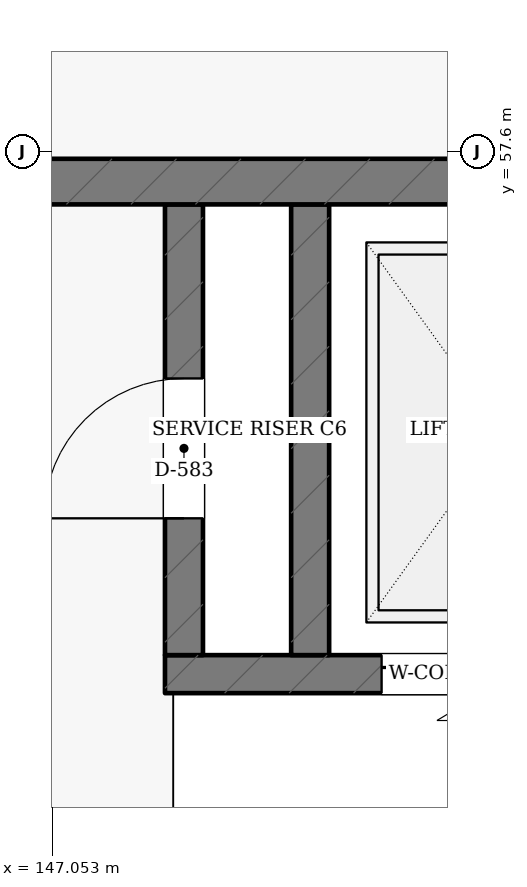
"""IFC4 building model, lengths in metres.
Left out: names, types, materials, properties, quantities, classifications, styles, units other than length and angle.
Written with IfcOpenShell. Run it as: python <this file> out.ifc"""

import sys

from ifc_helpers import new_model, si_unit, direction, frame, frame_2d, origin, place, context, subcontext, project, spatial, rectangle, extrude, element, fill, save


model = new_model("IFC4")
c1 = context("Model", 3, precision=1e-05, world=origin(), true_north=direction((0.0, 1.0)))
c2 = subcontext(c1, "Body", "Model", "MODEL_VIEW")
j1 = project(units=[si_unit("LENGTHUNIT", "METRE"), si_unit("PLANEANGLEUNIT", "RADIAN")], contexts=[c1])
p1 = place(None, origin())
s1 = spatial("IfcSite", under=j1, at=p1, CompositionType="ELEMENT")
p2 = place(p1, origin())
s2 = spatial("IfcBuilding", under=s1, at=p2, CompositionType="ELEMENT")
p3 = place(p2, frame((0.0, 0.0, 5.4)))
s3 = spatial("IfcBuildingStorey", under=s2, at=p3, CompositionType="ELEMENT", Elevation=5.4)
p4 = place(p3, frame((147.795, 54.16, 0.0), z_axis=(0.0, 0.0, 1.0), x_axis=(1.0, 0.0, 0.0)))
e1 = element("IfcWall", 1, at=p4, inside=s3, PredefinedType="SHEAR", context=c2, shape_type="SweptSolid", body=[
    extrude(rectangle(XDim=3.58, YDim=0.25, at=frame_2d((1.79, 0.0))), origin(), (0.0, 0.0, 1.0), 3.55),
])
p5 = place(p4, frame((1.425, 0.0, 0.0)))
e2 = element("IfcOpeningElement", 2, at=p5, cuts=e1, PredefinedType="OPENING", context=c2, shape_type="SweptSolid", body=[
    extrude(rectangle(XDim=1.3, YDim=2.2, at=frame_2d((0.65, 1.1))), frame((0.0, 0.135, 0.0), z_axis=(0.0, -1.0, 0.0), x_axis=(1.0, 0.0, 0.0)), (0.0, 0.0, 1.0), 0.27),
])
p6 = place(p3, frame((148.75, 54.285, 0.0), z_axis=(0.0, 0.0, 1.0), x_axis=(0.0, 1.0, 0.0)))
e3 = element("IfcWall", 3, at=p6, inside=s3, PredefinedType="SHEAR", context=c2, shape_type="SweptSolid", body=[
    extrude(rectangle(XDim=2.965, YDim=0.25, at=frame_2d((1.482, 0.0))), origin(), (0.0, 0.0, 1.0), 3.55),
])
p7 = place(p3, frame((147.92, 54.285, 0.0), z_axis=(0.0, 0.0, 1.0), x_axis=(0.0, 1.0, 0.0)))
e4 = element("IfcWall", 4, at=p7, inside=s3, PredefinedType="SHEAR", context=c2, shape_type="SweptSolid", body=[
    extrude(rectangle(XDim=2.965, YDim=0.25, at=frame_2d((1.482, 0.0))), origin(), (0.0, 0.0, 1.0), 3.55),
])
p8 = place(p7, frame((0.9, 0.0, 0.0)))
e5 = element("IfcOpeningElement", 5, at=p8, cuts=e4, PredefinedType="OPENING", context=c2, shape_type="SweptSolid", body=[
    extrude(rectangle(XDim=0.92, YDim=2.05, at=frame_2d((0.46, 1.025))), frame((0.0, 0.135, 0.0), z_axis=(0.0, -1.0, 0.0), x_axis=(1.0, 0.0, 0.0)), (0.0, 0.0, 1.0), 0.27),
])
p9 = place(p3, frame((144.0, 57.4, 0.0), z_axis=(0.0, 0.0, 1.0), x_axis=(1.0, 0.0, 0.0)))
e6 = element("IfcWall", 6, at=p9, inside=s3, PredefinedType="SHEAR", context=c2, shape_type="SweptSolid", body=[
    extrude(rectangle(XDim=14.23, YDim=0.3, at=frame_2d((7.115, 0.0))), origin(), (0.0, 0.0, 1.0), 3.55),
])
p10 = place(p5, origin())
e7 = element("IfcDoor", 7, at=p10, inside=s3, OperationType="SLIDING_TO_LEFT", PredefinedType="DOOR", context=c2, shape_type="SweptSolid", body=[
    extrude(rectangle(XDim=1.3, YDim=2.2, at=frame_2d((0.65, 1.1))), frame((0.0, 0.025, 0.0), z_axis=(0.0, -1.0, 0.0), x_axis=(1.0, 0.0, 0.0)), (0.0, 0.0, 1.0), 0.05),
])
fill(e2, e7)
p11 = place(p8, origin())
e8 = element("IfcDoor", 8, at=p11, inside=s3, OperationType="SINGLE_SWING_LEFT", PredefinedType="DOOR", context=c2, shape_type="SweptSolid", body=[
    extrude(rectangle(XDim=0.92, YDim=2.05, at=frame_2d((0.46, 1.025))), frame((0.0, 0.025, 0.0), z_axis=(0.0, -1.0, 0.0), x_axis=(1.0, 0.0, 0.0)), (0.0, 0.0, 1.0), 0.05),
])
fill(e5, e8)
save(model, sys.argv[1])
